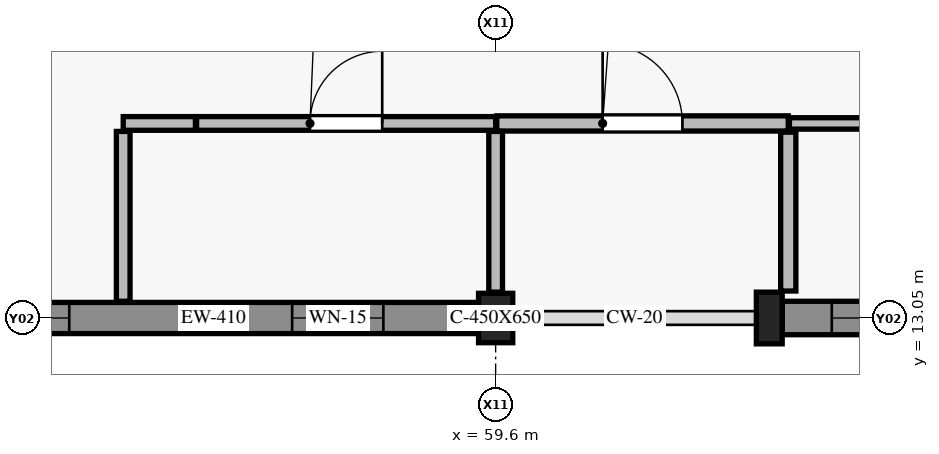
"""IFC4 building model, lengths in metres.
Left out: names, types, materials, properties, quantities, classifications, styles, units other than length and angle.
Written with IfcOpenShell. Run it as: python <this file> out.ifc"""

import sys

from ifc_helpers import new_model, si_unit, direction, frame, frame_2d, origin, origin_2d, place, context, subcontext, project, spatial, rectangle, extrude, element, fill, save


model = new_model("IFC4")
c1 = context("Model", 3, precision=1e-05, world=origin(), true_north=direction((0.0, 1.0)))
c2 = subcontext(c1, "Body", "Model", "MODEL_VIEW")
j1 = project(units=[si_unit("LENGTHUNIT", "METRE"), si_unit("PLANEANGLEUNIT", "RADIAN")], contexts=[c1])
p1 = place(None, origin())
s1 = spatial("IfcSite", under=j1, at=p1, CompositionType="ELEMENT")
p2 = place(p1, origin())
s2 = spatial("IfcBuilding", under=s1, at=p2, CompositionType="ELEMENT")
p3 = place(p2, frame((0.0, 0.0, 4.8)))
s3 = spatial("IfcBuildingStorey", under=s2, at=p3, CompositionType="ELEMENT", Elevation=4.8)
p4 = place(p3, frame((59.6, 13.05, 0.0), z_axis=(0.0, 0.0, 1.0), x_axis=(1.0, 0.0, 0.0)))
e1 = element("IfcColumn", 1, at=p4, inside=s3, PredefinedType="COLUMN", context=c2, shape_type="SweptSolid", body=[
    extrude(rectangle(XDim=0.45, YDim=0.65, at=origin_2d()), origin(), (0.0, 0.0, 1.0), 4.36),
])
p5 = place(p3, frame((63.2, 13.05, 0.0), z_axis=(0.0, 0.0, 1.0), x_axis=(1.0, 0.0, 0.0)))
e2 = element("IfcColumn", 2, at=p5, inside=s3, PredefinedType="PILASTER", context=c2, shape_type="SweptSolid", body=[
    extrude(rectangle(XDim=0.34, YDim=0.68, at=origin_2d()), origin(), (0.0, 0.0, 1.0), 4.2),
])
p6 = place(p3, frame((66.475, 13.05, 0.0), z_axis=(0.0, 0.0, 1.0), x_axis=(-1.0, 0.0, 0.0)))
e3 = element("IfcWall", 3, at=p6, inside=s3, PredefinedType="USERDEFINED", context=c2, shape_type="SweptSolid", body=[
    extrude(rectangle(XDim=3.105, YDim=0.44, at=frame_2d((1.552, 0.0))), origin(), (0.0, 0.0, 1.0), 3.38),
])
p7 = place(p6, frame((0.653, 0.0, 0.9)))
e4 = element("IfcOpeningElement", 4, at=p7, cuts=e3, PredefinedType="OPENING", context=c2, shape_type="SweptSolid", body=[
    extrude(rectangle(XDim=1.8, YDim=1.5, at=frame_2d((0.9, 0.75))), frame((0.0, 0.23, 0.0), z_axis=(0.0, -1.0, 0.0), x_axis=(1.0, 0.0, 0.0)), (0.0, 0.0, 1.0), 0.46),
])
p8 = place(p3, frame((59.375, 13.05, 0.0), z_axis=(0.0, 0.0, 1.0), x_axis=(-1.0, 0.0, 0.0)))
e5 = element("IfcWall", 5, at=p8, inside=s3, PredefinedType="USERDEFINED", context=c2, shape_type="SweptSolid", body=[
    extrude(rectangle(XDim=6.975, YDim=0.41, at=frame_2d((3.488, 0.0))), origin(), (0.0, 0.0, 1.0), 3.3),
])
p9 = place(p8, frame((1.252, 0.0, 0.6)))
e6 = element("IfcOpeningElement", 6, at=p9, cuts=e5, PredefinedType="OPENING", context=c2, shape_type="SweptSolid", body=[
    extrude(rectangle(XDim=1.2, YDim=2.2, at=frame_2d((0.6, 1.1))), frame((0.0, 0.215, 0.0), z_axis=(0.0, -1.0, 0.0), x_axis=(1.0, 0.0, 0.0)), (0.0, 0.0, 1.0), 0.43),
])
p10 = place(p8, frame((5.385, 0.0, 0.95)))
e7 = element("IfcOpeningElement", 7, at=p10, cuts=e5, PredefinedType="OPENING", context=c2, shape_type="SweptSolid", body=[
    extrude(rectangle(XDim=0.9, YDim=1.2, at=frame_2d((0.45, 0.6))), frame((0.0, 0.215, 0.0), z_axis=(0.0, -1.0, 0.0), x_axis=(1.0, 0.0, 0.0)), (0.0, 0.0, 1.0), 0.43),
])
p11 = place(p3, frame((54.7, 15.61, 0.0), z_axis=(0.0, 0.0, 1.0), x_axis=(1.0, 0.0, 0.0)))
e8 = element("IfcWall", 8, at=p11, inside=s3, PredefinedType="PLUMBINGWALL", context=c2, shape_type="SweptSolid", body=[
    extrude(rectangle(XDim=0.95, YDim=0.18, at=frame_2d((0.475, 0.0))), origin(), (0.0, 0.0, 1.0), 3.95),
])
p12 = place(p3, frame((55.665, 15.61, 0.0), z_axis=(0.0, 0.0, 1.0), x_axis=(1.0, 0.0, 0.0)))
e9 = element("IfcWall", 9, at=p12, inside=s3, PredefinedType="PLUMBINGWALL", context=c2, shape_type="SweptSolid", body=[
    extrude(rectangle(XDim=3.935, YDim=0.18, at=frame_2d((1.968, 0.0))), origin(), (0.0, 0.0, 1.0), 3.95),
])
p13 = place(p12, frame((1.492, 0.0, 0.0)))
e10 = element("IfcOpeningElement", 10, at=p13, cuts=e9, PredefinedType="OPENING", context=c2, shape_type="SweptSolid", body=[
    extrude(rectangle(XDim=0.95, YDim=2.1, at=frame_2d((0.475, 1.05))), frame((0.0, 0.1, 0.0), z_axis=(0.0, -1.0, 0.0), x_axis=(1.0, 0.0, 0.0)), (0.0, 0.0, 1.0), 0.2),
])
p14 = place(p3, frame((54.7, 13.27, 0.0), z_axis=(0.0, 0.0, 1.0), x_axis=(0.0, 1.0, 0.0)))
e11 = element("IfcWall", 11, at=p14, inside=s3, PredefinedType="PLUMBINGWALL", context=c2, shape_type="SweptSolid", body=[
    extrude(rectangle(XDim=2.235, YDim=0.18, at=frame_2d((1.117, 0.0))), origin(), (0.0, 0.0, 1.0), 3.95),
])
p15 = place(p3, frame((59.615, 15.61, 0.0), z_axis=(0.0, 0.0, 1.0), x_axis=(1.0, 0.0, 0.0)))
e12 = element("IfcWall", 12, at=p15, inside=s3, PredefinedType="PARTITIONING", context=c2, shape_type="SweptSolid", body=[
    extrude(rectangle(XDim=3.835, YDim=0.2, at=frame_2d((1.917, 0.0))), origin(), (0.0, 0.0, 1.0), 3.95),
])
p16 = place(p15, frame((1.393, 0.0, 0.0)))
e13 = element("IfcOpeningElement", 13, at=p16, cuts=e12, PredefinedType="OPENING", context=c2, shape_type="SweptSolid", body=[
    extrude(rectangle(XDim=1.05, YDim=2.15, at=frame_2d((0.525, 1.075))), frame((0.0, 0.11, 0.0), z_axis=(0.0, -1.0, 0.0), x_axis=(1.0, 0.0, 0.0)), (0.0, 0.0, 1.0), 0.22),
])
p17 = place(p3, frame((63.465, 15.61, 0.0), z_axis=(0.0, 0.0, 1.0), x_axis=(1.0, 0.0, 0.0)))
e14 = element("IfcWall", 14, at=p17, inside=s3, PredefinedType="PARTITIONING", context=c2, shape_type="SweptSolid", body=[
    extrude(rectangle(XDim=3.335, YDim=0.15, at=frame_2d((1.667, 0.0))), origin(), (0.0, 0.0, 1.0), 3.95),
])
p18 = place(p3, frame((59.6, 13.39, 0.0), z_axis=(0.0, 0.0, 1.0), x_axis=(0.0, 1.0, 0.0)))
e15 = element("IfcWall", 15, at=p18, inside=s3, PredefinedType="PLUMBINGWALL", context=c2, shape_type="SweptSolid", body=[
    extrude(rectangle(XDim=2.115, YDim=0.18, at=frame_2d((1.058, 0.0))), origin(), (0.0, 0.0, 1.0), 3.95),
])
p19 = place(p3, frame((63.45, 13.405, 0.0), z_axis=(0.0, 0.0, 1.0), x_axis=(0.0, 1.0, 0.0)))
e16 = element("IfcWall", 16, at=p19, inside=s3, PredefinedType="PARTITIONING", context=c2, shape_type="SweptSolid", body=[
    extrude(rectangle(XDim=2.09, YDim=0.2, at=frame_2d((1.045, 0.0))), origin(), (0.0, 0.0, 1.0), 3.95),
])
p20 = place(p7, origin())
e17 = element("IfcWindow", 17, at=p20, inside=s3, PartitioningType="SINGLE_PANEL", PredefinedType="WINDOW", context=c2, shape_type="SweptSolid", body=[
    extrude(rectangle(XDim=1.8, YDim=1.5, at=frame_2d((0.9, 0.75))), frame((0.0, 0.03, 0.0), z_axis=(0.0, -1.0, 0.0), x_axis=(1.0, 0.0, 0.0)), (0.0, 0.0, 1.0), 0.06),
])
fill(e4, e17)
p21 = place(p9, origin())
e18 = element("IfcWindow", 18, at=p21, inside=s3, PartitioningType="SINGLE_PANEL", PredefinedType="WINDOW", context=c2, shape_type="SweptSolid", body=[
    extrude(rectangle(XDim=1.2, YDim=2.2, at=frame_2d((0.6, 1.1))), frame((0.0, 0.03, 0.0), z_axis=(0.0, -1.0, 0.0), x_axis=(1.0, 0.0, 0.0)), (0.0, 0.0, 1.0), 0.06),
])
fill(e6, e18)
p22 = place(p10, origin())
e19 = element("IfcWindow", 19, at=p22, inside=s3, PartitioningType="SINGLE_PANEL", PredefinedType="WINDOW", context=c2, shape_type="SweptSolid", body=[
    extrude(rectangle(XDim=0.9, YDim=1.2, at=frame_2d((0.45, 0.6))), frame((0.0, 0.03, 0.0), z_axis=(0.0, -1.0, 0.0), x_axis=(1.0, 0.0, 0.0)), (0.0, 0.0, 1.0), 0.06),
])
fill(e7, e19)
p23 = place(p13, origin())
e20 = element("IfcDoor", 20, at=p23, inside=s3, OperationType="SINGLE_SWING_RIGHT", PredefinedType="DOOR", context=c2, shape_type="SweptSolid", body=[
    extrude(rectangle(XDim=0.95, YDim=2.1, at=frame_2d((0.475, 1.05))), frame((0.0, 0.025, 0.0), z_axis=(0.0, -1.0, 0.0), x_axis=(1.0, 0.0, 0.0)), (0.0, 0.0, 1.0), 0.05),
])
fill(e10, e20)
p24 = place(p16, origin())
e21 = element("IfcDoor", 21, at=p24, inside=s3, OperationType="SINGLE_SWING_LEFT", PredefinedType="DOOR", context=c2, shape_type="SweptSolid", body=[
    extrude(rectangle(XDim=1.05, YDim=2.15, at=frame_2d((0.525, 1.075))), frame((0.0, 0.025, 0.0), z_axis=(0.0, -1.0, 0.0), x_axis=(1.0, 0.0, 0.0)), (0.0, 0.0, 1.0), 0.05),
])
fill(e13, e21)
save(model, sys.argv[1])
